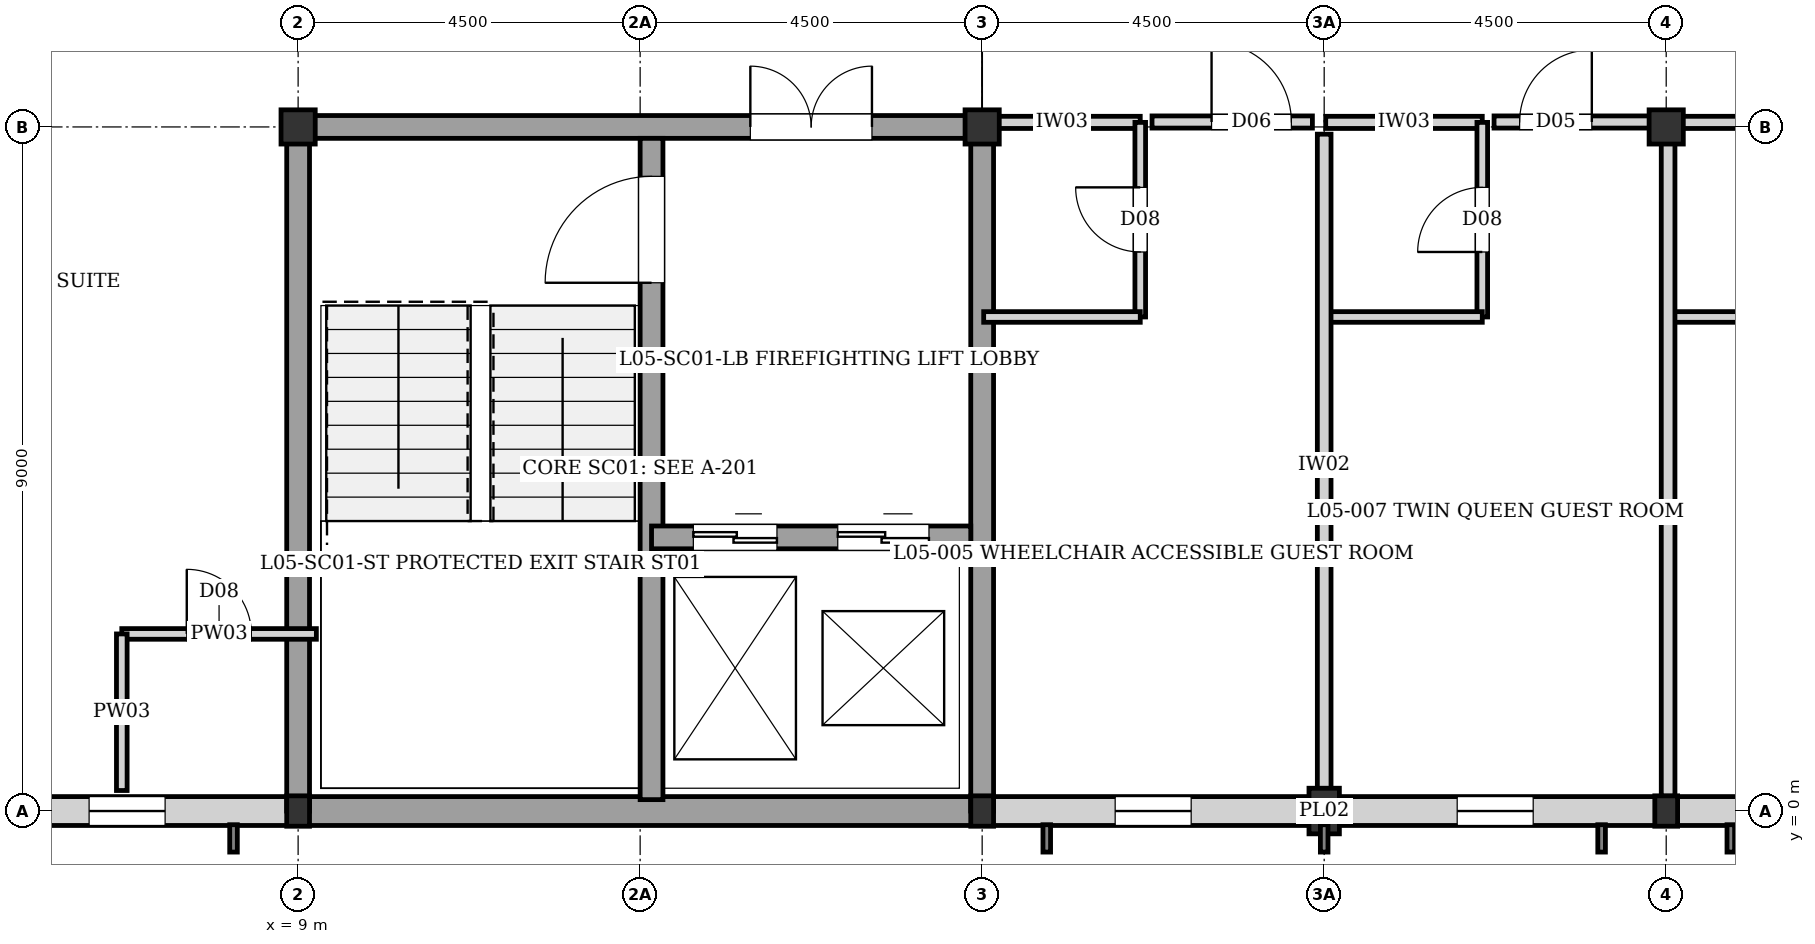
"""IFC4 building model, lengths in metres.
Left out: names, types, materials, properties, quantities, classifications, styles, units other than length and angle.
Written with IfcOpenShell. Run it as: python <this file> out.ifc"""

import sys

from ifc_helpers import new_model, si_unit, direction, frame, frame_2d, origin, origin_2d, place, context, subcontext, project, spatial, rectangle, i_section, extrude, element, fill, save


model = new_model("IFC4")
c1 = context("Model", 3, precision=1e-05, world=origin(), true_north=direction((0.0, 1.0)))
c2 = subcontext(c1, "Body", "Model", "MODEL_VIEW")
j1 = project(units=[si_unit("LENGTHUNIT", "METRE"), si_unit("PLANEANGLEUNIT", "RADIAN")], contexts=[c1])
p1 = place(None, origin())
s1 = spatial("IfcSite", under=j1, at=p1, CompositionType="ELEMENT")
p2 = place(p1, origin())
s2 = spatial("IfcBuilding", under=s1, at=p2, CompositionType="ELEMENT")
p3 = place(p2, frame((0.0, 0.0, 17.6)))
s3 = spatial("IfcBuildingStorey", under=s2, at=p3, CompositionType="ELEMENT", Elevation=17.6)
p4 = place(p3, frame((9.0, 0.0, 0.0), z_axis=(0.0, 0.0, 1.0), x_axis=(1.0, 0.0, 0.0)))
e1 = element("IfcColumn", 1, at=p4, inside=s3, PredefinedType="COLUMN", context=c2, shape_type="SweptSolid", body=[
    extrude(i_section(OverallWidth=0.3, OverallDepth=0.4, WebThickness=0.013, FlangeThickness=0.024, at=origin_2d()), origin(), (0.0, 0.0, 1.0), 3.04),
])
p5 = place(p3, frame((9.0, 9.0, 0.0), z_axis=(0.0, 0.0, 1.0), x_axis=(1.0, 0.0, 0.0)))
e2 = element("IfcColumn", 2, at=p5, inside=s3, PredefinedType="COLUMN", context=c2, shape_type="SweptSolid", body=[
    extrude(rectangle(XDim=0.45, YDim=0.45, at=origin_2d()), origin(), (0.0, 0.0, 1.0), 3.04),
])
p6 = place(p3, frame((18.0, 0.0, 0.0), z_axis=(0.0, 0.0, 1.0), x_axis=(1.0, 0.0, 0.0)))
e3 = element("IfcColumn", 3, at=p6, inside=s3, PredefinedType="COLUMN", context=c2, shape_type="SweptSolid", body=[
    extrude(i_section(OverallWidth=0.3, OverallDepth=0.4, WebThickness=0.013, FlangeThickness=0.024, at=origin_2d()), origin(), (0.0, 0.0, 1.0), 3.04),
])
p7 = place(p3, frame((18.0, 9.0, 0.0), z_axis=(0.0, 0.0, 1.0), x_axis=(1.0, 0.0, 0.0)))
e4 = element("IfcColumn", 4, at=p7, inside=s3, PredefinedType="COLUMN", context=c2, shape_type="SweptSolid", body=[
    extrude(rectangle(XDim=0.45, YDim=0.45, at=origin_2d()), origin(), (0.0, 0.0, 1.0), 3.04),
])
p8 = place(p3, frame((27.0, 0.0, 0.0), z_axis=(0.0, 0.0, 1.0), x_axis=(1.0, 0.0, 0.0)))
e5 = element("IfcColumn", 5, at=p8, inside=s3, PredefinedType="COLUMN", context=c2, shape_type="SweptSolid", body=[
    extrude(i_section(OverallWidth=0.3, OverallDepth=0.4, WebThickness=0.013, FlangeThickness=0.024, at=origin_2d()), origin(), (0.0, 0.0, 1.0), 3.04),
])
p9 = place(p3, frame((27.0, 9.0, 0.0), z_axis=(0.0, 0.0, 1.0), x_axis=(1.0, 0.0, 0.0)))
e6 = element("IfcColumn", 6, at=p9, inside=s3, PredefinedType="COLUMN", context=c2, shape_type="SweptSolid", body=[
    extrude(rectangle(XDim=0.45, YDim=0.45, at=origin_2d()), origin(), (0.0, 0.0, 1.0), 3.04),
])
p10 = place(p3, frame((22.5, 0.0, 0.0), z_axis=(0.0, 0.0, 1.0), x_axis=(1.0, 0.0, 0.0)))
e7 = element("IfcColumn", 7, at=p10, inside=s3, PredefinedType="PILASTER", context=c2, shape_type="SweptSolid", body=[
    extrude(rectangle(XDim=0.4, YDim=0.6, at=origin_2d()), origin(), (0.0, 0.0, 1.0), 3.04),
])
p11 = place(p3, frame((35.87, 0.0, 0.0), z_axis=(0.0, 0.0, 1.0), x_axis=(-1.0, 0.0, 0.0)))
e8 = element("IfcWall", 8, at=p11, inside=s3, PredefinedType="SOLIDWALL", context=c2, shape_type="SweptSolid", body=[
    extrude(rectangle(XDim=8.87, YDim=0.38, at=frame_2d((4.435, 0.0))), origin(), (0.0, 0.0, 1.0), 2.42),
])
p12 = place(p11, frame((1.62, 0.0, 0.35)))
e9 = element("IfcOpeningElement", 9, at=p12, cuts=e8, PredefinedType="OPENING", context=c2, shape_type="SweptSolid", body=[
    extrude(rectangle(XDim=1.0, YDim=1.6, at=frame_2d((0.5, 0.8))), frame((0.0, 0.2, 0.0), z_axis=(0.0, -1.0, 0.0), x_axis=(1.0, 0.0, 0.0)), (0.0, 0.0, 1.0), 0.4),
])
p13 = place(p11, frame((6.12, 0.0, 0.35)))
e10 = element("IfcOpeningElement", 10, at=p13, cuts=e8, PredefinedType="OPENING", context=c2, shape_type="SweptSolid", body=[
    extrude(rectangle(XDim=1.0, YDim=1.6, at=frame_2d((0.5, 0.8))), frame((0.0, 0.2, 0.0), z_axis=(0.0, -1.0, 0.0), x_axis=(1.0, 0.0, 0.0)), (0.0, 0.0, 1.0), 0.4),
])
p14 = place(p3, frame((27.0, 0.0, 0.0), z_axis=(0.0, 0.0, 1.0), x_axis=(-1.0, 0.0, 0.0)))
e11 = element("IfcWall", 11, at=p14, inside=s3, PredefinedType="SOLIDWALL", context=c2, shape_type="SweptSolid", body=[
    extrude(rectangle(XDim=8.87, YDim=0.38, at=frame_2d((4.435, 0.0))), origin(), (0.0, 0.0, 1.0), 2.48),
])
p15 = place(p14, frame((1.75, 0.0, 0.35)))
e12 = element("IfcOpeningElement", 12, at=p15, cuts=e11, PredefinedType="OPENING", context=c2, shape_type="SweptSolid", body=[
    extrude(rectangle(XDim=1.0, YDim=1.6, at=frame_2d((0.5, 0.8))), frame((0.0, 0.2, 0.0), z_axis=(0.0, -1.0, 0.0), x_axis=(1.0, 0.0, 0.0)), (0.0, 0.0, 1.0), 0.4),
])
p16 = place(p14, frame((6.25, 0.0, 0.35)))
e13 = element("IfcOpeningElement", 13, at=p16, cuts=e11, PredefinedType="OPENING", context=c2, shape_type="SweptSolid", body=[
    extrude(rectangle(XDim=1.0, YDim=1.6, at=frame_2d((0.5, 0.8))), frame((0.0, 0.2, 0.0), z_axis=(0.0, -1.0, 0.0), x_axis=(1.0, 0.0, 0.0)), (0.0, 0.0, 1.0), 0.4),
])
p17 = place(p3, frame((18.0, 0.0, 0.0), z_axis=(0.0, 0.0, 1.0), x_axis=(-1.0, 0.0, 0.0)))
e14 = element("IfcWall", 14, at=p17, inside=s3, PredefinedType="SOLIDWALL", context=c2, shape_type="SweptSolid", body=[
    extrude(rectangle(XDim=9.0, YDim=0.38, at=frame_2d((4.5, 0.0))), origin(), (0.0, 0.0, 1.0), 2.82),
])
p18 = place(p3, frame((8.87, 0.0, 0.0), z_axis=(0.0, 0.0, 1.0), x_axis=(-1.0, 0.0, 0.0)))
e15 = element("IfcWall", 15, at=p18, inside=s3, PredefinedType="SOLIDWALL", context=c2, shape_type="SweptSolid", body=[
    extrude(rectangle(XDim=8.87, YDim=0.38, at=frame_2d((4.435, 0.0))), origin(), (0.0, 0.0, 1.0), 2.38),
])
p19 = place(p18, frame((1.62, 0.0, 0.35)))
e16 = element("IfcOpeningElement", 16, at=p19, cuts=e15, PredefinedType="OPENING", context=c2, shape_type="SweptSolid", body=[
    extrude(rectangle(XDim=1.0, YDim=1.6, at=frame_2d((0.5, 0.8))), frame((0.0, 0.2, 0.0), z_axis=(0.0, -1.0, 0.0), x_axis=(1.0, 0.0, 0.0)), (0.0, 0.0, 1.0), 0.4),
])
p20 = place(p18, frame((6.12, 0.0, 0.35)))
e17 = element("IfcOpeningElement", 17, at=p20, cuts=e15, PredefinedType="OPENING", context=c2, shape_type="SweptSolid", body=[
    extrude(rectangle(XDim=1.0, YDim=1.6, at=frame_2d((0.5, 0.8))), frame((0.0, 0.2, 0.0), z_axis=(0.0, -1.0, 0.0), x_axis=(1.0, 0.0, 0.0)), (0.0, 0.0, 1.0), 0.4),
])
p21 = place(p3, frame((18.0, 0.0, 0.0), z_axis=(0.0, 0.0, 1.0), x_axis=(0.0, 1.0, 0.0)))
e18 = element("IfcWall", 18, at=p21, inside=s3, PredefinedType="SHEAR", context=c2, shape_type="SweptSolid", body=[
    extrude(rectangle(XDim=9.0, YDim=0.3, at=frame_2d((4.5, 0.0))), origin(), (0.0, 0.0, 1.0), 2.82),
])
p22 = place(p3, frame((9.0, 9.0, 0.0), z_axis=(0.0, 0.0, 1.0), x_axis=(1.0, 0.0, 0.0)))
e19 = element("IfcWall", 19, at=p22, inside=s3, PredefinedType="SHEAR", context=c2, shape_type="SweptSolid", body=[
    extrude(rectangle(XDim=9.0, YDim=0.3, at=frame_2d((4.5, 0.0))), origin(), (0.0, 0.0, 1.0), 2.82),
])
p23 = place(p22, frame((5.95, 0.0, 0.0)))
e20 = element("IfcOpeningElement", 20, at=p23, cuts=e19, PredefinedType="OPENING", context=c2, shape_type="SweptSolid", body=[
    extrude(rectangle(XDim=1.6, YDim=2.1, at=frame_2d((0.8, 1.05))), frame((0.0, 0.16, 0.0), z_axis=(0.0, -1.0, 0.0), x_axis=(1.0, 0.0, 0.0)), (0.0, 0.0, 1.0), 0.32),
])
p24 = place(p3, frame((9.0, 0.0, 0.0), z_axis=(0.0, 0.0, 1.0), x_axis=(0.0, 1.0, 0.0)))
e21 = element("IfcWall", 21, at=p24, inside=s3, PredefinedType="SHEAR", context=c2, shape_type="SweptSolid", body=[
    extrude(rectangle(XDim=9.0, YDim=0.3, at=frame_2d((4.5, 0.0))), origin(), (0.0, 0.0, 1.0), 2.82),
])
p25 = place(p3, frame((13.65, 0.15, 0.0), z_axis=(0.0, 0.0, 1.0), x_axis=(0.0, 1.0, 0.0)))
e22 = element("IfcWall", 22, at=p25, inside=s3, PredefinedType="SHEAR", context=c2, shape_type="SweptSolid", body=[
    extrude(rectangle(XDim=8.7, YDim=0.3, at=frame_2d((4.35, 0.0))), origin(), (0.0, 0.0, 1.0), 2.82),
])
p26 = place(p25, frame((6.8, 0.0, 0.0)))
e23 = element("IfcOpeningElement", 23, at=p26, cuts=e22, PredefinedType="OPENING", context=c2, shape_type="SweptSolid", body=[
    extrude(rectangle(XDim=1.4, YDim=2.02, at=frame_2d((0.7, 1.01))), frame((0.0, 0.16, 0.0), z_axis=(0.0, -1.0, 0.0), x_axis=(1.0, 0.0, 0.0)), (0.0, 0.0, 1.0), 0.32),
])
p27 = place(p3, frame((13.65, 3.6, 0.0), z_axis=(0.0, 0.0, 1.0), x_axis=(1.0, 0.0, 0.0)))
e24 = element("IfcWall", 24, at=p27, inside=s3, PredefinedType="SHEAR", context=c2, shape_type="SweptSolid", body=[
    extrude(rectangle(XDim=4.2, YDim=0.3, at=frame_2d((2.1, 0.0))), origin(), (0.0, 0.0, 1.0), 2.82),
])
p28 = place(p27, frame((0.55, 0.0, 0.0)))
e25 = element("IfcOpeningElement", 25, at=p28, cuts=e24, PredefinedType="OPENING", context=c2, shape_type="SweptSolid", body=[
    extrude(rectangle(XDim=1.1, YDim=2.1, at=frame_2d((0.55, 1.05))), frame((0.0, 0.16, 0.0), z_axis=(0.0, -1.0, 0.0), x_axis=(1.0, 0.0, 0.0)), (0.0, 0.0, 1.0), 0.32),
])
p29 = place(p27, frame((2.45, 0.0, 0.0)))
e26 = element("IfcOpeningElement", 26, at=p29, cuts=e24, PredefinedType="OPENING", context=c2, shape_type="SweptSolid", body=[
    extrude(rectangle(XDim=1.2, YDim=2.2, at=frame_2d((0.6, 1.1))), frame((0.0, 0.16, 0.0), z_axis=(0.0, -1.0, 0.0), x_axis=(1.0, 0.0, 0.0)), (0.0, 0.0, 1.0), 0.32),
])
p30 = place(p3, frame((6.68, 2.33, 0.0), z_axis=(0.0, 0.0, 1.0), x_axis=(1.0, 0.0, 0.0)))
e27 = element("IfcWall", 27, at=p30, inside=s3, PredefinedType="PLUMBINGWALL", context=c2, shape_type="SweptSolid", body=[
    extrude(rectangle(XDim=2.56, YDim=0.14, at=frame_2d((1.28, 0.0))), origin(), (0.0, 0.0, 1.0), 2.82),
])
p31 = place(p30, frame((0.855, 0.0, 0.0)))
e28 = element("IfcOpeningElement", 28, at=p31, cuts=e27, PredefinedType="OPENING", context=c2, shape_type="SweptSolid", body=[
    extrude(rectangle(XDim=0.85, YDim=2.04, at=frame_2d((0.425, 1.02))), frame((0.0, 0.08, 0.0), z_axis=(0.0, -1.0, 0.0), x_axis=(1.0, 0.0, 0.0)), (0.0, 0.0, 1.0), 0.16),
])
p32 = place(p3, frame((6.68, 0.27, 0.0), z_axis=(0.0, 0.0, 1.0), x_axis=(0.0, 1.0, 0.0)))
e29 = element("IfcWall", 29, at=p32, inside=s3, PredefinedType="PLUMBINGWALL", context=c2, shape_type="SweptSolid", body=[
    extrude(rectangle(XDim=2.06, YDim=0.14, at=frame_2d((1.03, 0.0))), origin(), (0.0, 0.0, 1.0), 2.82),
])
p33 = place(p3, frame((18.02, 9.06, 0.0), z_axis=(0.0, 0.0, 1.0), x_axis=(1.0, 0.0, 0.0)))
e30 = element("IfcWall", 30, at=p33, inside=s3, PredefinedType="PARTITIONING", context=c2, shape_type="SweptSolid", body=[
    extrude(rectangle(XDim=2.06, YDim=0.16, at=frame_2d((1.03, 0.0))), origin(), (0.0, 0.0, 1.0), 2.34),
])
p34 = place(p3, frame((20.08, 6.5, 0.0), z_axis=(0.0, 0.0, 1.0), x_axis=(0.0, 1.0, 0.0)))
e31 = element("IfcWall", 31, at=p34, inside=s3, PredefinedType="PLUMBINGWALL", context=c2, shape_type="SweptSolid", body=[
    extrude(rectangle(XDim=2.56, YDim=0.14, at=frame_2d((1.28, 0.0))), origin(), (0.0, 0.0, 1.0), 2.82),
])
p35 = place(p34, frame((0.855, 0.0, 0.0)))
e32 = element("IfcOpeningElement", 32, at=p35, cuts=e31, PredefinedType="OPENING", context=c2, shape_type="SweptSolid", body=[
    extrude(rectangle(XDim=0.85, YDim=2.04, at=frame_2d((0.425, 1.02))), frame((0.0, 0.08, 0.0), z_axis=(0.0, -1.0, 0.0), x_axis=(1.0, 0.0, 0.0)), (0.0, 0.0, 1.0), 0.16),
])
p36 = place(p3, frame((18.02, 6.5, 0.0), z_axis=(0.0, 0.0, 1.0), x_axis=(1.0, 0.0, 0.0)))
e33 = element("IfcWall", 33, at=p36, inside=s3, PredefinedType="PLUMBINGWALL", context=c2, shape_type="SweptSolid", body=[
    extrude(rectangle(XDim=2.06, YDim=0.14, at=frame_2d((1.03, 0.0))), origin(), (0.0, 0.0, 1.0), 2.82),
])
p37 = place(p3, frame((22.52, 9.06, 0.0), z_axis=(0.0, 0.0, 1.0), x_axis=(1.0, 0.0, 0.0)))
e34 = element("IfcWall", 34, at=p37, inside=s3, PredefinedType="PARTITIONING", context=c2, shape_type="SweptSolid", body=[
    extrude(rectangle(XDim=2.06, YDim=0.16, at=frame_2d((1.03, 0.0))), origin(), (0.0, 0.0, 1.0), 2.34),
])
p38 = place(p3, frame((24.58, 6.5, 0.0), z_axis=(0.0, 0.0, 1.0), x_axis=(0.0, 1.0, 0.0)))
e35 = element("IfcWall", 35, at=p38, inside=s3, PredefinedType="PLUMBINGWALL", context=c2, shape_type="SweptSolid", body=[
    extrude(rectangle(XDim=2.56, YDim=0.14, at=frame_2d((1.28, 0.0))), origin(), (0.0, 0.0, 1.0), 2.82),
])
p39 = place(p38, frame((0.855, 0.0, 0.0)))
e36 = element("IfcOpeningElement", 36, at=p39, cuts=e35, PredefinedType="OPENING", context=c2, shape_type="SweptSolid", body=[
    extrude(rectangle(XDim=0.85, YDim=2.04, at=frame_2d((0.425, 1.02))), frame((0.0, 0.08, 0.0), z_axis=(0.0, -1.0, 0.0), x_axis=(1.0, 0.0, 0.0)), (0.0, 0.0, 1.0), 0.16),
])
p40 = place(p3, frame((22.52, 6.5, 0.0), z_axis=(0.0, 0.0, 1.0), x_axis=(1.0, 0.0, 0.0)))
e37 = element("IfcWall", 37, at=p40, inside=s3, PredefinedType="PLUMBINGWALL", context=c2, shape_type="SweptSolid", body=[
    extrude(rectangle(XDim=2.06, YDim=0.14, at=frame_2d((1.03, 0.0))), origin(), (0.0, 0.0, 1.0), 2.82),
])
p41 = place(p3, frame((27.07, 9.06, 0.0), z_axis=(0.0, 0.0, 1.0), x_axis=(1.0, 0.0, 0.0)))
e38 = element("IfcWall", 38, at=p41, inside=s3, PredefinedType="PARTITIONING", context=c2, shape_type="SweptSolid", body=[
    extrude(rectangle(XDim=2.06, YDim=0.16, at=frame_2d((1.03, 0.0))), origin(), (0.0, 0.0, 1.0), 2.29),
])
p42 = place(p3, frame((27.07, 6.5, 0.0), z_axis=(0.0, 0.0, 1.0), x_axis=(1.0, 0.0, 0.0)))
e39 = element("IfcWall", 39, at=p42, inside=s3, PredefinedType="PLUMBINGWALL", context=c2, shape_type="SweptSolid", body=[
    extrude(rectangle(XDim=2.06, YDim=0.14, at=frame_2d((1.03, 0.0))), origin(), (0.0, 0.0, 1.0), 2.82),
])
p43 = place(p3, frame((22.5, 0.195, 0.0), z_axis=(0.0, 0.0, 1.0), x_axis=(0.0, 1.0, 0.0)))
e40 = element("IfcWall", 40, at=p43, inside=s3, PredefinedType="PARTITIONING", context=c2, shape_type="SweptSolid", body=[
    extrude(rectangle(XDim=8.71, YDim=0.18, at=frame_2d((4.355, 0.0))), origin(), (0.0, 0.0, 1.0), 2.82),
])
p44 = place(p3, frame((27.025, 0.195, 0.0), z_axis=(0.0, 0.0, 1.0), x_axis=(0.0, 1.0, 0.0)))
e41 = element("IfcWall", 41, at=p44, inside=s3, PredefinedType="PARTITIONING", context=c2, shape_type="SweptSolid", body=[
    extrude(rectangle(XDim=8.71, YDim=0.18, at=frame_2d((4.355, 0.0))), origin(), (0.0, 0.0, 1.0), 2.34),
])
p45 = place(p3, frame((20.235, 9.065, 0.0), z_axis=(0.0, 0.0, 1.0), x_axis=(1.0, 0.0, 0.0)))
e42 = element("IfcWall", 42, at=p45, inside=s3, PredefinedType="PARTITIONING", context=c2, shape_type="SweptSolid", body=[
    extrude(rectangle(XDim=2.11, YDim=0.16, at=frame_2d((1.055, 0.0))), origin(), (0.0, 0.0, 1.0), 2.34),
])
p46 = place(p45, frame((0.783, 0.0, 0.0)))
e43 = element("IfcOpeningElement", 43, at=p46, cuts=e42, PredefinedType="OPENING", context=c2, shape_type="SweptSolid", body=[
    extrude(rectangle(XDim=1.05, YDim=2.15, at=frame_2d((0.525, 1.075))), frame((0.0, 0.09, 0.0), z_axis=(0.0, -1.0, 0.0), x_axis=(1.0, 0.0, 0.0)), (0.0, 0.0, 1.0), 0.18),
])
p47 = place(p3, frame((24.735, 9.065, 0.0), z_axis=(0.0, 0.0, 1.0), x_axis=(1.0, 0.0, 0.0)))
e44 = element("IfcWall", 44, at=p47, inside=s3, PredefinedType="PARTITIONING", context=c2, shape_type="SweptSolid", body=[
    extrude(rectangle(XDim=2.135, YDim=0.16, at=frame_2d((1.067, 0.0))), origin(), (0.0, 0.0, 1.0), 2.34),
])
p48 = place(p47, frame((0.336, 0.0, 0.0)))
e45 = element("IfcOpeningElement", 45, at=p48, cuts=e44, PredefinedType="OPENING", context=c2, shape_type="SweptSolid", body=[
    extrude(rectangle(XDim=0.95, YDim=2.15, at=frame_2d((0.475, 1.075))), frame((0.0, 0.09, 0.0), z_axis=(0.0, -1.0, 0.0), x_axis=(1.0, 0.0, 0.0)), (0.0, 0.0, 1.0), 0.18),
])
p49 = place(p15, origin())
e46 = element("IfcWindow", 46, at=p49, inside=s3, PartitioningType="SINGLE_PANEL", PredefinedType="WINDOW", context=c2, shape_type="SweptSolid", body=[
    extrude(rectangle(XDim=1.0, YDim=1.6, at=frame_2d((0.5, 0.8))), frame((0.0, 0.03, 0.0), z_axis=(0.0, -1.0, 0.0), x_axis=(1.0, 0.0, 0.0)), (0.0, 0.0, 1.0), 0.06),
])
fill(e12, e46)
p50 = place(p16, origin())
e47 = element("IfcWindow", 47, at=p50, inside=s3, PartitioningType="SINGLE_PANEL", PredefinedType="WINDOW", context=c2, shape_type="SweptSolid", body=[
    extrude(rectangle(XDim=1.0, YDim=1.6, at=frame_2d((0.5, 0.8))), frame((0.0, 0.03, 0.0), z_axis=(0.0, -1.0, 0.0), x_axis=(1.0, 0.0, 0.0)), (0.0, 0.0, 1.0), 0.06),
])
fill(e13, e47)
p51 = place(p19, origin())
e48 = element("IfcWindow", 48, at=p51, inside=s3, PartitioningType="SINGLE_PANEL", PredefinedType="WINDOW", context=c2, shape_type="SweptSolid", body=[
    extrude(rectangle(XDim=1.0, YDim=1.6, at=frame_2d((0.5, 0.8))), frame((0.0, 0.03, 0.0), z_axis=(0.0, -1.0, 0.0), x_axis=(1.0, 0.0, 0.0)), (0.0, 0.0, 1.0), 0.06),
])
fill(e16, e48)
p52 = place(p23, origin())
e49 = element("IfcDoor", 49, at=p52, inside=s3, OperationType="DOUBLE_DOOR_SINGLE_SWING", PredefinedType="DOOR", context=c2, shape_type="SweptSolid", body=[
    extrude(rectangle(XDim=1.6, YDim=2.1, at=frame_2d((0.8, 1.05))), frame((0.0, 0.025, 0.0), z_axis=(0.0, -1.0, 0.0), x_axis=(1.0, 0.0, 0.0)), (0.0, 0.0, 1.0), 0.05),
])
fill(e20, e49)
p53 = place(p26, origin())
e50 = element("IfcDoor", 50, at=p53, inside=s3, OperationType="SINGLE_SWING_LEFT", PredefinedType="DOOR", context=c2, shape_type="SweptSolid", body=[
    extrude(rectangle(XDim=1.4, YDim=2.02, at=frame_2d((0.7, 1.01))), frame((0.0, 0.025, 0.0), z_axis=(0.0, -1.0, 0.0), x_axis=(1.0, 0.0, 0.0)), (0.0, 0.0, 1.0), 0.05),
])
fill(e23, e50)
p54 = place(p28, origin())
e51 = element("IfcDoor", 51, at=p54, inside=s3, OperationType="DOUBLE_DOOR_SLIDING", PredefinedType="DOOR", context=c2, shape_type="SweptSolid", body=[
    extrude(rectangle(XDim=1.1, YDim=2.1, at=frame_2d((0.55, 1.05))), frame((0.0, 0.025, 0.0), z_axis=(0.0, -1.0, 0.0), x_axis=(1.0, 0.0, 0.0)), (0.0, 0.0, 1.0), 0.05),
])
fill(e25, e51)
p55 = place(p29, origin())
e52 = element("IfcDoor", 52, at=p55, inside=s3, OperationType="DOUBLE_DOOR_SLIDING", PredefinedType="DOOR", context=c2, shape_type="SweptSolid", body=[
    extrude(rectangle(XDim=1.2, YDim=2.2, at=frame_2d((0.6, 1.1))), frame((0.0, 0.025, 0.0), z_axis=(0.0, -1.0, 0.0), x_axis=(1.0, 0.0, 0.0)), (0.0, 0.0, 1.0), 0.05),
])
fill(e26, e52)
p56 = place(p31, origin())
e53 = element("IfcDoor", 53, at=p56, inside=s3, OperationType="SINGLE_SWING_LEFT", PredefinedType="DOOR", context=c2, shape_type="SweptSolid", body=[
    extrude(rectangle(XDim=0.85, YDim=2.04, at=frame_2d((0.425, 1.02))), frame((0.0, 0.025, 0.0), z_axis=(0.0, -1.0, 0.0), x_axis=(1.0, 0.0, 0.0)), (0.0, 0.0, 1.0), 0.05),
])
fill(e28, e53)
p57 = place(p35, origin())
e54 = element("IfcDoor", 54, at=p57, inside=s3, OperationType="SINGLE_SWING_RIGHT", PredefinedType="DOOR", context=c2, shape_type="SweptSolid", body=[
    extrude(rectangle(XDim=0.85, YDim=2.04, at=frame_2d((0.425, 1.02))), frame((0.0, 0.025, 0.0), z_axis=(0.0, -1.0, 0.0), x_axis=(1.0, 0.0, 0.0)), (0.0, 0.0, 1.0), 0.05),
])
fill(e32, e54)
p58 = place(p39, origin())
e55 = element("IfcDoor", 55, at=p58, inside=s3, OperationType="SINGLE_SWING_LEFT", PredefinedType="DOOR", context=c2, shape_type="SweptSolid", body=[
    extrude(rectangle(XDim=0.85, YDim=2.04, at=frame_2d((0.425, 1.02))), frame((0.0, 0.025, 0.0), z_axis=(0.0, -1.0, 0.0), x_axis=(1.0, 0.0, 0.0)), (0.0, 0.0, 1.0), 0.05),
])
fill(e36, e55)
p59 = place(p46, origin())
e56 = element("IfcDoor", 56, at=p59, inside=s3, OperationType="SINGLE_SWING_LEFT", PredefinedType="DOOR", context=c2, shape_type="SweptSolid", body=[
    extrude(rectangle(XDim=1.05, YDim=2.15, at=frame_2d((0.525, 1.075))), frame((0.0, 0.025, 0.0), z_axis=(0.0, -1.0, 0.0), x_axis=(1.0, 0.0, 0.0)), (0.0, 0.0, 1.0), 0.05),
])
fill(e43, e56)
p60 = place(p48, origin())
e57 = element("IfcDoor", 57, at=p60, inside=s3, OperationType="SINGLE_SWING_RIGHT", PredefinedType="DOOR", context=c2, shape_type="SweptSolid", body=[
    extrude(rectangle(XDim=0.95, YDim=2.15, at=frame_2d((0.475, 1.075))), frame((0.0, 0.025, 0.0), z_axis=(0.0, -1.0, 0.0), x_axis=(1.0, 0.0, 0.0)), (0.0, 0.0, 1.0), 0.05),
])
fill(e45, e57)
save(model, sys.argv[1])
